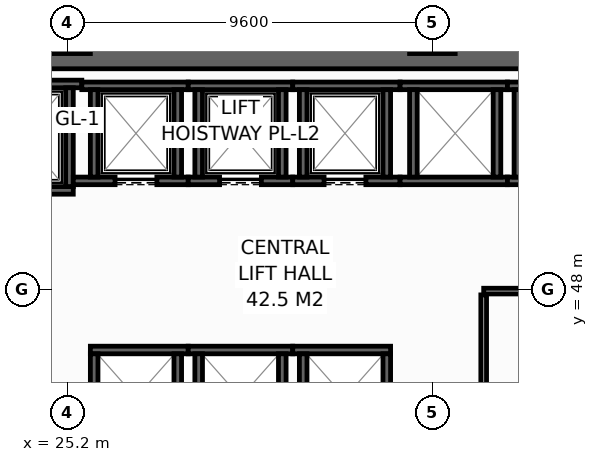
"""IFC4 building model, lengths in metres.
Left out: names, types, materials, properties, quantities, classifications, styles, units other than length and angle.
Written with IfcOpenShell. Run it as: python <this file> out.ifc"""

import sys

from ifc_helpers import new_model, si_unit, direction, frame, frame_2d, origin, origin_2d, place, context, subcontext, project, spatial, rectangle, hollow_rectangle, extrude, element, fill, save


model = new_model("IFC4")
c1 = context("Model", 3, precision=1e-05, world=origin(), true_north=direction((0.0, 1.0)))
c2 = subcontext(c1, "Body", "Model", "MODEL_VIEW")
j1 = project(units=[si_unit("LENGTHUNIT", "METRE"), si_unit("PLANEANGLEUNIT", "RADIAN")], contexts=[c1])
p1 = place(None, origin())
s1 = spatial("IfcSite", under=j1, at=p1, CompositionType="ELEMENT")
p2 = place(p1, origin())
s2 = spatial("IfcBuilding", under=s1, at=p2, CompositionType="ELEMENT")
p3 = place(p2, frame((0.0, 0.0, 97.2)))
s3 = spatial("IfcBuildingStorey", under=s2, at=p3, CompositionType="ELEMENT", Elevation=97.2)
p4 = place(p3, frame((13.5, 54.1, 0.0), z_axis=(0.0, 0.0, 1.0), x_axis=(1.0, 0.0, 0.0)))
e1 = element("IfcWall", 1, at=p4, inside=s3, PredefinedType="SHEAR", context=c2, shape_type="SweptSolid", body=[
    extrude(rectangle(XDim=32.9, YDim=0.6, at=frame_2d((16.45, 0.0))), origin(), (0.0, 0.0, 1.0), 4.15),
])
for number, where, z_axis, x_axis in (
    (2, (25.2, 54.8, 0.0), (0.0, 0.0, 1.0), (1.0, 0.0, 0.0)),
    (3, (34.8, 54.8, 0.0), (0.0, 0.0, 1.0), (1.0, 0.0, 0.0)),
):
    element("IfcColumn", number, at=place(p3, frame(where, z_axis=z_axis, x_axis=x_axis)), inside=s3, PredefinedType="COLUMN", context=c2, shape_type="SweptSolid", body=[
        extrude(hollow_rectangle(XDim=1.2, YDim=1.2, WallThickness=0.055, at=origin_2d()), origin(), (0.0, 0.0, 1.0), 4.4),
    ])
p5 = place(p3, frame((22.5, 50.6, 0.0), z_axis=(0.0, 0.0, 1.0), x_axis=(1.0, 0.0, 0.0)))
e4 = element("IfcWall", 4, at=p5, inside=s3, PredefinedType="SHEAR", context=c2, shape_type="SweptSolid", body=[
    extrude(rectangle(XDim=2.85, YDim=0.2, at=frame_2d((1.425, 0.0))), origin(), (0.0, 0.0, 1.0), 4.15),
])
p6 = place(p5, frame((0.925, 0.0, 0.0)))
e5 = element("IfcOpeningElement", 5, at=p6, cuts=e4, PredefinedType="OPENING", context=c2, shape_type="SweptSolid", body=[
    extrude(rectangle(XDim=1.25, YDim=2.3, at=frame_2d((0.625, 1.15))), frame((0.0, 0.11, 0.0), z_axis=(0.0, -1.0, 0.0), x_axis=(1.0, 0.0, 0.0)), (0.0, 0.0, 1.0), 0.22),
])
p7 = place(p3, frame((22.5, 53.4, 0.0), z_axis=(0.0, 0.0, 1.0), x_axis=(1.0, 0.0, 0.0)))
e6 = element("IfcWall", 6, at=p7, inside=s3, PredefinedType="SHEAR", context=c2, shape_type="SweptSolid", body=[
    extrude(rectangle(XDim=3.075, YDim=0.2, at=frame_2d((1.538, 0.0))), origin(), (0.0, 0.0, 1.0), 4.15),
])
p8 = place(p3, frame((25.25, 50.7, 0.0), z_axis=(0.0, 0.0, 1.0), x_axis=(0.0, 1.0, 0.0)))
e7 = element("IfcWall", 7, at=p8, inside=s3, PredefinedType="SHEAR", context=c2, shape_type="SweptSolid", body=[
    extrude(rectangle(XDim=2.6, YDim=0.2, at=frame_2d((1.3, 0.0))), origin(), (0.0, 0.0, 1.0), 4.15),
])
p9 = place(p3, frame((25.35, 50.85, 0.0), z_axis=(0.0, 0.0, 1.0), x_axis=(1.0, 0.0, 0.0)))
e8 = element("IfcWall", 8, at=p9, inside=s3, PredefinedType="SHEAR", context=c2, shape_type="SweptSolid", body=[
    extrude(rectangle(XDim=3.025, YDim=0.2, at=frame_2d((1.512, 0.0))), origin(), (0.0, 0.0, 1.0), 4.15),
])
p10 = place(p9, frame((1.1, 0.0, 0.0)))
e9 = element("IfcOpeningElement", 9, at=p10, cuts=e8, PredefinedType="OPENING", context=c2, shape_type="SweptSolid", body=[
    extrude(rectangle(XDim=1.1, YDim=2.2, at=frame_2d((0.55, 1.1))), frame((0.0, 0.11, 0.0), z_axis=(0.0, -1.0, 0.0), x_axis=(1.0, 0.0, 0.0)), (0.0, 0.0, 1.0), 0.22),
])
p11 = place(p3, frame((25.575, 53.35, 0.0), z_axis=(0.0, 0.0, 1.0), x_axis=(1.0, 0.0, 0.0)))
e10 = element("IfcWall", 10, at=p11, inside=s3, PredefinedType="SHEAR", context=c2, shape_type="SweptSolid", body=[
    extrude(rectangle(XDim=2.8, YDim=0.2, at=frame_2d((1.4, 0.0))), origin(), (0.0, 0.0, 1.0), 4.15),
])
for number, where, z_axis, x_axis in (
    (11, (25.9, 50.95, 0.0), (0.0, 0.0, 1.0), (0.0, 1.0, 0.0)),
    (12, (28.1, 50.95, 0.0), (0.0, 0.0, 1.0), (0.0, 1.0, 0.0)),
):
    element("IfcWall", number, at=place(p3, frame(where, z_axis=z_axis, x_axis=x_axis)), inside=s3, PredefinedType="SHEAR", context=c2, shape_type="SweptSolid", body=[
        extrude(rectangle(XDim=2.3, YDim=0.2, at=frame_2d((1.15, 0.0))), origin(), (0.0, 0.0, 1.0), 4.15),
    ])
p12 = place(p3, frame((28.375, 50.85, 0.0), z_axis=(0.0, 0.0, 1.0), x_axis=(1.0, 0.0, 0.0)))
e13 = element("IfcWall", 13, at=p12, inside=s3, PredefinedType="SHEAR", context=c2, shape_type="SweptSolid", body=[
    extrude(rectangle(XDim=2.75, YDim=0.2, at=frame_2d((1.375, 0.0))), origin(), (0.0, 0.0, 1.0), 4.15),
])
p13 = place(p12, frame((0.825, 0.0, 0.0)))
e14 = element("IfcOpeningElement", 14, at=p13, cuts=e13, PredefinedType="OPENING", context=c2, shape_type="SweptSolid", body=[
    extrude(rectangle(XDim=1.1, YDim=2.2, at=frame_2d((0.55, 1.1))), frame((0.0, 0.11, 0.0), z_axis=(0.0, -1.0, 0.0), x_axis=(1.0, 0.0, 0.0)), (0.0, 0.0, 1.0), 0.22),
])
p14 = place(p3, frame((28.375, 53.35, 0.0), z_axis=(0.0, 0.0, 1.0), x_axis=(1.0, 0.0, 0.0)))
e15 = element("IfcWall", 15, at=p14, inside=s3, PredefinedType="SHEAR", context=c2, shape_type="SweptSolid", body=[
    extrude(rectangle(XDim=2.75, YDim=0.2, at=frame_2d((1.375, 0.0))), origin(), (0.0, 0.0, 1.0), 4.15),
])
for number, where, z_axis, x_axis in (
    (16, (28.65, 50.95, 0.0), (0.0, 0.0, 1.0), (0.0, 1.0, 0.0)),
    (17, (30.85, 50.95, 0.0), (0.0, 0.0, 1.0), (0.0, 1.0, 0.0)),
):
    element("IfcWall", number, at=place(p3, frame(where, z_axis=z_axis, x_axis=x_axis)), inside=s3, PredefinedType="SHEAR", context=c2, shape_type="SweptSolid", body=[
        extrude(rectangle(XDim=2.3, YDim=0.2, at=frame_2d((1.15, 0.0))), origin(), (0.0, 0.0, 1.0), 4.15),
    ])
p15 = place(p3, frame((31.125, 50.85, 0.0), z_axis=(0.0, 0.0, 1.0), x_axis=(1.0, 0.0, 0.0)))
e18 = element("IfcWall", 18, at=p15, inside=s3, PredefinedType="SHEAR", context=c2, shape_type="SweptSolid", body=[
    extrude(rectangle(XDim=2.825, YDim=0.2, at=frame_2d((1.413, 0.0))), origin(), (0.0, 0.0, 1.0), 4.15),
])
p16 = place(p15, frame((0.825, 0.0, 0.0)))
e19 = element("IfcOpeningElement", 19, at=p16, cuts=e18, PredefinedType="OPENING", context=c2, shape_type="SweptSolid", body=[
    extrude(rectangle(XDim=1.1, YDim=2.2, at=frame_2d((0.55, 1.1))), frame((0.0, 0.11, 0.0), z_axis=(0.0, -1.0, 0.0), x_axis=(1.0, 0.0, 0.0)), (0.0, 0.0, 1.0), 0.22),
])
p17 = place(p3, frame((31.125, 53.35, 0.0), z_axis=(0.0, 0.0, 1.0), x_axis=(1.0, 0.0, 0.0)))
e20 = element("IfcWall", 20, at=p17, inside=s3, PredefinedType="SHEAR", context=c2, shape_type="SweptSolid", body=[
    extrude(rectangle(XDim=2.825, YDim=0.2, at=frame_2d((1.413, 0.0))), origin(), (0.0, 0.0, 1.0), 4.15),
])
for number, where, z_axis, x_axis in (
    (21, (31.4, 50.95, 0.0), (0.0, 0.0, 1.0), (0.0, 1.0, 0.0)),
    (22, (33.6, 50.95, 0.0), (0.0, 0.0, 1.0), (0.0, 1.0, 0.0)),
):
    element("IfcWall", number, at=place(p3, frame(where, z_axis=z_axis, x_axis=x_axis)), inside=s3, PredefinedType="SHEAR", context=c2, shape_type="SweptSolid", body=[
        extrude(rectangle(XDim=2.3, YDim=0.2, at=frame_2d((1.15, 0.0))), origin(), (0.0, 0.0, 1.0), 4.15),
    ])
p18 = place(p3, frame((25.8, 46.4, 0.0), z_axis=(0.0, 0.0, 1.0), x_axis=(1.0, 0.0, 0.0)))
e23 = element("IfcWall", 23, at=p18, inside=s3, PredefinedType="SHEAR", context=c2, shape_type="SweptSolid", body=[
    extrude(rectangle(XDim=2.575, YDim=0.2, at=frame_2d((1.288, 0.0))), origin(), (0.0, 0.0, 1.0), 4.15),
])
for number, where, z_axis, x_axis in (
    (24, (25.9, 44.0, 0.0), (0.0, 0.0, 1.0), (0.0, 1.0, 0.0)),
    (25, (28.1, 44.0, 0.0), (0.0, 0.0, 1.0), (0.0, 1.0, 0.0)),
):
    element("IfcWall", number, at=place(p3, frame(where, z_axis=z_axis, x_axis=x_axis)), inside=s3, PredefinedType="SHEAR", context=c2, shape_type="SweptSolid", body=[
        extrude(rectangle(XDim=2.3, YDim=0.2, at=frame_2d((1.15, 0.0))), origin(), (0.0, 0.0, 1.0), 4.15),
    ])
p19 = place(p3, frame((28.375, 46.4, 0.0), z_axis=(0.0, 0.0, 1.0), x_axis=(1.0, 0.0, 0.0)))
e26 = element("IfcWall", 26, at=p19, inside=s3, PredefinedType="SHEAR", context=c2, shape_type="SweptSolid", body=[
    extrude(rectangle(XDim=2.75, YDim=0.2, at=frame_2d((1.375, 0.0))), origin(), (0.0, 0.0, 1.0), 4.15),
])
for number, where, z_axis, x_axis in (
    (27, (28.65, 44.0, 0.0), (0.0, 0.0, 1.0), (0.0, 1.0, 0.0)),
    (28, (30.85, 44.0, 0.0), (0.0, 0.0, 1.0), (0.0, 1.0, 0.0)),
):
    element("IfcWall", number, at=place(p3, frame(where, z_axis=z_axis, x_axis=x_axis)), inside=s3, PredefinedType="SHEAR", context=c2, shape_type="SweptSolid", body=[
        extrude(rectangle(XDim=2.3, YDim=0.2, at=frame_2d((1.15, 0.0))), origin(), (0.0, 0.0, 1.0), 4.15),
    ])
p20 = place(p3, frame((31.125, 46.4, 0.0), z_axis=(0.0, 0.0, 1.0), x_axis=(1.0, 0.0, 0.0)))
e29 = element("IfcWall", 29, at=p20, inside=s3, PredefinedType="SHEAR", context=c2, shape_type="SweptSolid", body=[
    extrude(rectangle(XDim=2.575, YDim=0.2, at=frame_2d((1.288, 0.0))), origin(), (0.0, 0.0, 1.0), 4.15),
])
for number, where, z_axis, x_axis in (
    (30, (31.4, 44.0, 0.0), (0.0, 0.0, 1.0), (0.0, 1.0, 0.0)),
    (31, (33.6, 44.0, 0.0), (0.0, 0.0, 1.0), (0.0, 1.0, 0.0)),
):
    element("IfcWall", number, at=place(p3, frame(where, z_axis=z_axis, x_axis=x_axis)), inside=s3, PredefinedType="SHEAR", context=c2, shape_type="SweptSolid", body=[
        extrude(rectangle(XDim=2.3, YDim=0.2, at=frame_2d((1.15, 0.0))), origin(), (0.0, 0.0, 1.0), 4.15),
    ])
for number, where, z_axis, x_axis in (
    (32, (33.95, 50.85, 0.0), (0.0, 0.0, 1.0), (1.0, 0.0, 0.0)),
    (33, (33.95, 53.35, 0.0), (0.0, 0.0, 1.0), (1.0, 0.0, 0.0)),
):
    element("IfcWall", number, at=place(p3, frame(where, z_axis=z_axis, x_axis=x_axis)), inside=s3, PredefinedType="SHEAR", context=c2, shape_type="SweptSolid", body=[
        extrude(rectangle(XDim=2.825, YDim=0.2, at=frame_2d((1.413, 0.0))), origin(), (0.0, 0.0, 1.0), 4.15),
    ])
for number, where, z_axis, x_axis in (
    (34, (34.3, 50.95, 0.0), (0.0, 0.0, 1.0), (0.0, 1.0, 0.0)),
    (35, (36.5, 50.95, 0.0), (0.0, 0.0, 1.0), (0.0, 1.0, 0.0)),
):
    element("IfcWall", number, at=place(p3, frame(where, z_axis=z_axis, x_axis=x_axis)), inside=s3, PredefinedType="SHEAR", context=c2, shape_type="SweptSolid", body=[
        extrude(rectangle(XDim=2.3, YDim=0.2, at=frame_2d((1.15, 0.0))), origin(), (0.0, 0.0, 1.0), 4.15),
    ])
for number, where, z_axis, x_axis in (
    (36, (36.775, 50.85, 0.0), (0.0, 0.0, 1.0), (1.0, 0.0, 0.0)),
    (37, (36.775, 53.35, 0.0), (0.0, 0.0, 1.0), (1.0, 0.0, 0.0)),
):
    element("IfcWall", number, at=place(p3, frame(where, z_axis=z_axis, x_axis=x_axis)), inside=s3, PredefinedType="SHEAR", context=c2, shape_type="SweptSolid", body=[
        extrude(rectangle(XDim=2.75, YDim=0.2, at=frame_2d((1.375, 0.0))), origin(), (0.0, 0.0, 1.0), 4.15),
    ])
p21 = place(p3, frame((37.05, 50.95, 0.0), z_axis=(0.0, 0.0, 1.0), x_axis=(0.0, 1.0, 0.0)))
e38 = element("IfcWall", 38, at=p21, inside=s3, PredefinedType="SHEAR", context=c2, shape_type="SweptSolid", body=[
    extrude(rectangle(XDim=2.3, YDim=0.2, at=frame_2d((1.15, 0.0))), origin(), (0.0, 0.0, 1.0), 4.15),
])
p22 = place(p3, frame((36.15, 47.95, 0.0), z_axis=(0.0, 0.0, 1.0), x_axis=(1.0, 0.0, 0.0)))
e39 = element("IfcWall", 39, at=p22, inside=s3, PredefinedType="PARTITIONING", context=c2, shape_type="SweptSolid", body=[
    extrude(rectangle(XDim=6.35, YDim=0.15, at=frame_2d((3.175, 0.0))), origin(), (0.0, 0.0, 1.0), 4.15),
])
p23 = place(p3, frame((36.15, 45.22, 0.0), z_axis=(0.0, 0.0, 1.0), x_axis=(0.0, 1.0, 0.0)))
e40 = element("IfcWall", 40, at=p23, inside=s3, PredefinedType="PARTITIONING", context=c2, shape_type="SweptSolid", body=[
    extrude(rectangle(XDim=2.63, YDim=0.15, at=frame_2d((1.315, 0.0))), origin(), (0.0, 0.0, 1.0), 4.15),
])
p24 = place(p10, origin())
e41 = element("IfcDoor", 41, at=p24, inside=s3, OperationType="SLIDING_TO_LEFT", PredefinedType="DOOR", context=c2, shape_type="SweptSolid", body=[
    extrude(rectangle(XDim=1.1, YDim=2.2, at=frame_2d((0.55, 1.1))), frame((0.0, 0.025, 0.0), z_axis=(0.0, -1.0, 0.0), x_axis=(1.0, 0.0, 0.0)), (0.0, 0.0, 1.0), 0.05),
])
fill(e9, e41)
p25 = place(p13, origin())
e42 = element("IfcDoor", 42, at=p25, inside=s3, OperationType="SLIDING_TO_LEFT", PredefinedType="DOOR", context=c2, shape_type="SweptSolid", body=[
    extrude(rectangle(XDim=1.1, YDim=2.2, at=frame_2d((0.55, 1.1))), frame((0.0, 0.025, 0.0), z_axis=(0.0, -1.0, 0.0), x_axis=(1.0, 0.0, 0.0)), (0.0, 0.0, 1.0), 0.05),
])
fill(e14, e42)
p26 = place(p16, origin())
e43 = element("IfcDoor", 43, at=p26, inside=s3, OperationType="SLIDING_TO_LEFT", PredefinedType="DOOR", context=c2, shape_type="SweptSolid", body=[
    extrude(rectangle(XDim=1.1, YDim=2.2, at=frame_2d((0.55, 1.1))), frame((0.0, 0.025, 0.0), z_axis=(0.0, -1.0, 0.0), x_axis=(1.0, 0.0, 0.0)), (0.0, 0.0, 1.0), 0.05),
])
fill(e19, e43)
save(model, sys.argv[1])
